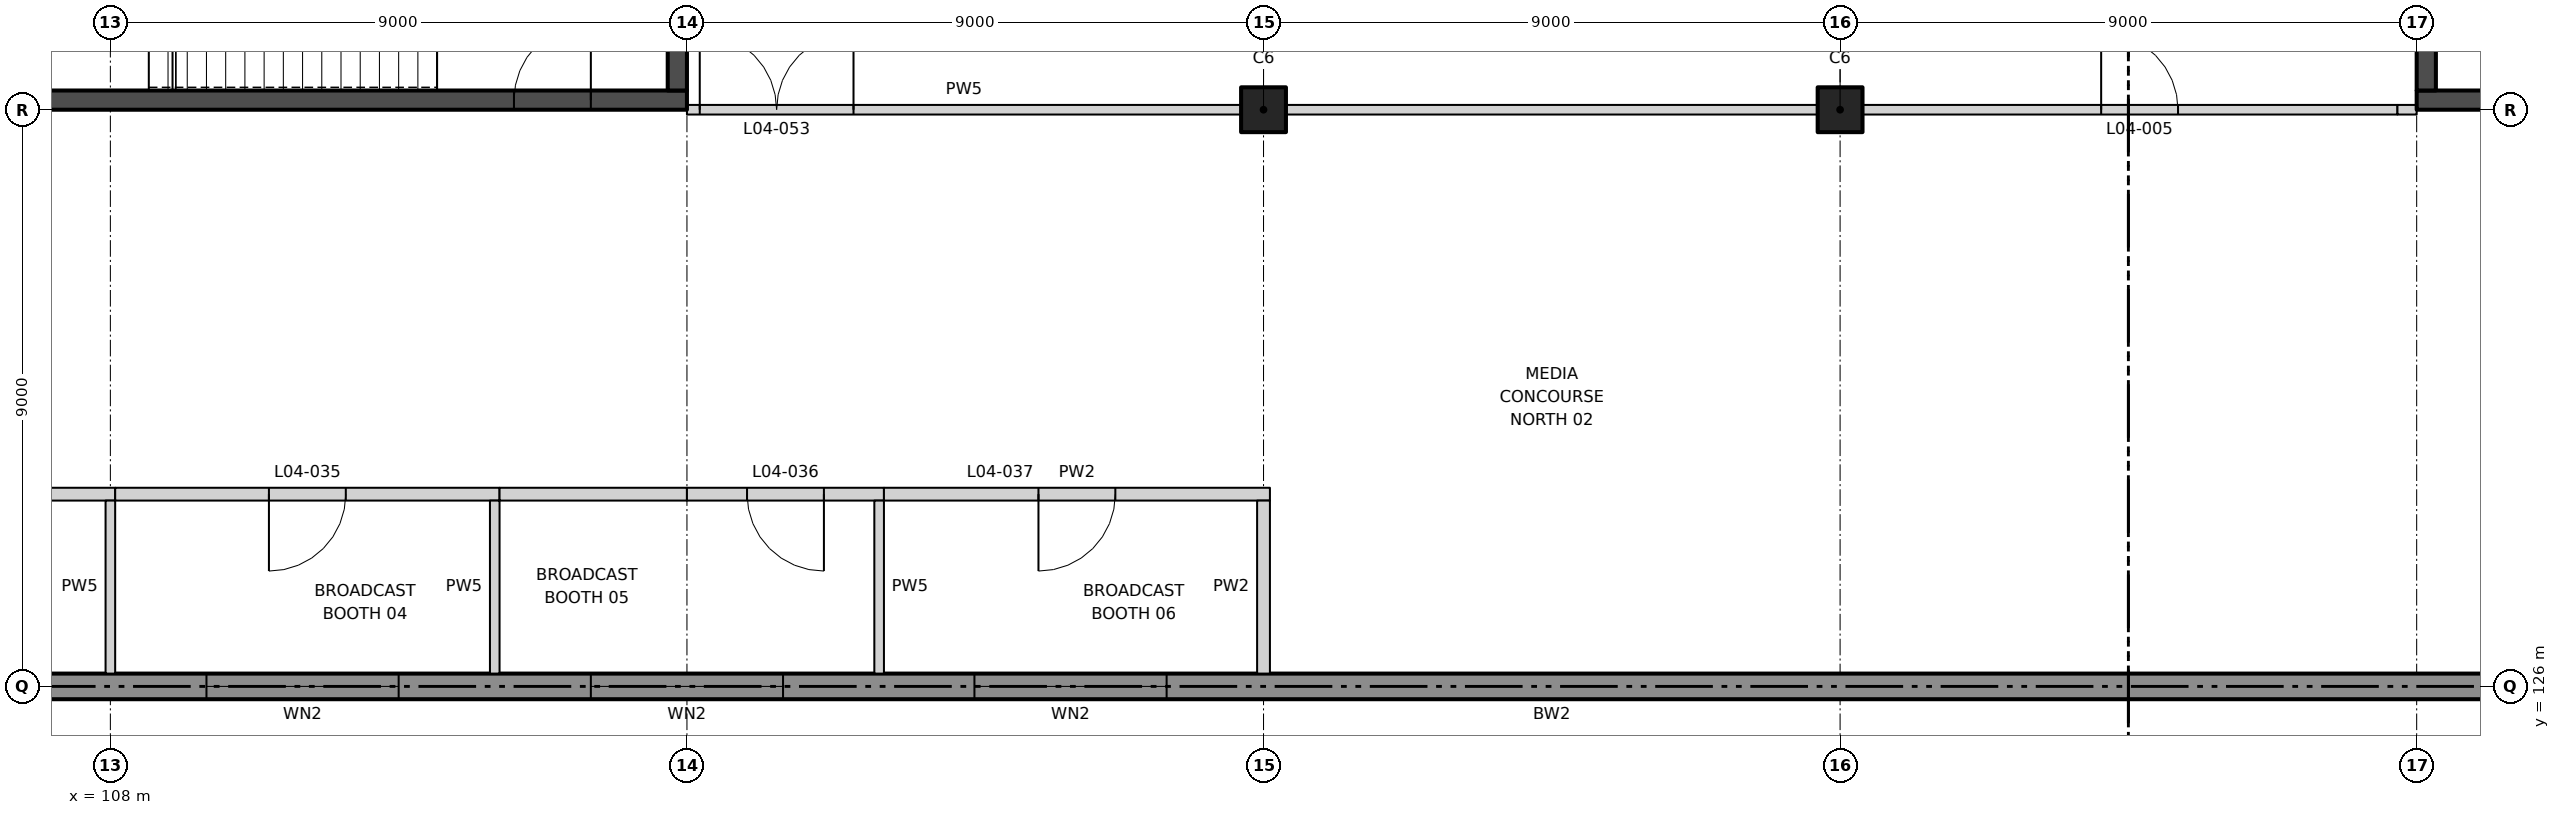
"""IFC4 building model, lengths in metres.
Left out: names, types, materials, properties, quantities, classifications, styles, units other than length and angle.
Written with IfcOpenShell. Run it as: python <this file> out.ifc"""

import sys

from ifc_helpers import new_model, si_unit, direction, frame, frame_2d, origin, origin_2d, place, context, subcontext, project, spatial, rectangle, extrude, element, fill, save


model = new_model("IFC4")
c1 = context("Model", 3, precision=1e-05, world=origin(), true_north=direction((0.0, 1.0)))
c2 = subcontext(c1, "Body", "Model", "MODEL_VIEW")
j1 = project(units=[si_unit("LENGTHUNIT", "METRE"), si_unit("PLANEANGLEUNIT", "RADIAN")], contexts=[c1])
p1 = place(None, origin())
s1 = spatial("IfcSite", under=j1, at=p1, CompositionType="ELEMENT")
p2 = place(p1, origin())
s2 = spatial("IfcBuilding", under=s1, at=p2, CompositionType="ELEMENT")
p3 = place(p2, frame((0.0, 0.0, 28.0)))
s3 = spatial("IfcBuildingStorey", under=s2, at=p3, CompositionType="ELEMENT", Elevation=28.0)
for number, where, z_axis, x_axis in (
    (1, (126.0, 135.0, 0.0), (0.0, 0.0, 1.0), (1.0, 0.0, 0.0)),
    (2, (135.0, 135.0, 0.0), (0.0, 0.0, 1.0), (1.0, 0.0, 0.0)),
):
    element("IfcColumn", number, at=place(p3, frame(where, z_axis=z_axis, x_axis=x_axis)), inside=s3, PredefinedType="COLUMN", context=c2, shape_type="SweptSolid", body=[
        extrude(rectangle(XDim=0.7, YDim=0.7, at=origin_2d()), origin(), (0.0, 0.0, 1.0), 5.5),
    ])
p4 = place(p3, frame((171.0, 126.0, 0.0), z_axis=(0.0, 0.0, 1.0), x_axis=(-1.0, 0.0, 0.0)))
e3 = element("IfcWall", 3, at=p4, inside=s3, PredefinedType="SOLIDWALL", context=c2, shape_type="SweptSolid", body=[
    extrude(rectangle(XDim=81.0, YDim=0.4, at=frame_2d((40.5, 0.0))), origin(), (0.0, 0.0, 1.0), 5.5),
])
p5 = place(p4, frame((75.288, 0.0, 0.9)))
e4 = element("IfcOpeningElement", 4, at=p5, cuts=e3, PredefinedType="OPENING", context=c2, shape_type="SweptSolid", body=[
    extrude(rectangle(XDim=3.0, YDim=1.8, at=frame_2d((1.5, 0.9))), frame((0.0, 0.21, 0.0), z_axis=(0.0, -1.0, 0.0), x_axis=(1.0, 0.0, 0.0)), (0.0, 0.0, 1.0), 0.42),
])
p6 = place(p4, frame((70.5, 0.0, 0.9)))
e5 = element("IfcOpeningElement", 5, at=p6, cuts=e3, PredefinedType="OPENING", context=c2, shape_type="SweptSolid", body=[
    extrude(rectangle(XDim=3.0, YDim=1.8, at=frame_2d((1.5, 0.9))), frame((0.0, 0.21, 0.0), z_axis=(0.0, -1.0, 0.0), x_axis=(1.0, 0.0, 0.0)), (0.0, 0.0, 1.0), 0.42),
])
p7 = place(p4, frame((64.5, 0.0, 0.9)))
e6 = element("IfcOpeningElement", 6, at=p7, cuts=e3, PredefinedType="OPENING", context=c2, shape_type="SweptSolid", body=[
    extrude(rectangle(XDim=3.0, YDim=1.8, at=frame_2d((1.5, 0.9))), frame((0.0, 0.21, 0.0), z_axis=(0.0, -1.0, 0.0), x_axis=(1.0, 0.0, 0.0)), (0.0, 0.0, 1.0), 0.42),
])
p8 = place(p4, frame((58.5, 0.0, 0.9)))
e7 = element("IfcOpeningElement", 7, at=p8, cuts=e3, PredefinedType="OPENING", context=c2, shape_type="SweptSolid", body=[
    extrude(rectangle(XDim=3.0, YDim=1.8, at=frame_2d((1.5, 0.9))), frame((0.0, 0.21, 0.0), z_axis=(0.0, -1.0, 0.0), x_axis=(1.0, 0.0, 0.0)), (0.0, 0.0, 1.0), 0.42),
])
p9 = place(p4, frame((52.5, 0.0, 0.9)))
e8 = element("IfcOpeningElement", 8, at=p9, cuts=e3, PredefinedType="OPENING", context=c2, shape_type="SweptSolid", body=[
    extrude(rectangle(XDim=3.0, YDim=1.8, at=frame_2d((1.5, 0.9))), frame((0.0, 0.21, 0.0), z_axis=(0.0, -1.0, 0.0), x_axis=(1.0, 0.0, 0.0)), (0.0, 0.0, 1.0), 0.42),
])
p10 = place(p4, frame((46.512, 0.0, 0.9)))
e9 = element("IfcOpeningElement", 9, at=p10, cuts=e3, PredefinedType="OPENING", context=c2, shape_type="SweptSolid", body=[
    extrude(rectangle(XDim=3.0, YDim=1.8, at=frame_2d((1.5, 0.9))), frame((0.0, 0.21, 0.0), z_axis=(0.0, -1.0, 0.0), x_axis=(1.0, 0.0, 0.0)), (0.0, 0.0, 1.0), 0.42),
])
p11 = place(p4, frame((3.9, 0.0, 0.0)))
e10 = element("IfcOpeningElement", 10, at=p11, cuts=e3, PredefinedType="OPENING", context=c2, shape_type="SweptSolid", body=[
    extrude(rectangle(XDim=1.2, YDim=2.1, at=frame_2d((0.6, 1.05))), frame((0.0, 0.21, 0.0), z_axis=(0.0, -1.0, 0.0), x_axis=(1.0, 0.0, 0.0)), (0.0, 0.0, 1.0), 0.42),
])
p12 = place(p4, frame((79.2, 0.0, 0.0)))
e11 = element("IfcOpeningElement", 11, at=p12, cuts=e3, PredefinedType="OPENING", context=c2, shape_type="SweptSolid", body=[
    extrude(rectangle(XDim=1.2, YDim=2.1, at=frame_2d((0.6, 1.05))), frame((0.0, 0.21, 0.0), z_axis=(0.0, -1.0, 0.0), x_axis=(1.0, 0.0, 0.0)), (0.0, 0.0, 1.0), 0.42),
])
p13 = place(p3, frame((102.075, 129.0, 0.0), z_axis=(0.0, 0.0, 1.0), x_axis=(1.0, 0.0, 0.0)))
e12 = element("IfcWall", 12, at=p13, inside=s3, PredefinedType="PARTITIONING", context=c2, shape_type="SweptSolid", body=[
    extrude(rectangle(XDim=6.0, YDim=0.2, at=frame_2d((3.0, 0.0))), origin(), (0.0, 0.0, 1.0), 5.5),
])
p14 = place(p13, frame((2.4, 0.0, 0.0)))
e13 = element("IfcOpeningElement", 13, at=p14, cuts=e12, PredefinedType="OPENING", context=c2, shape_type="SweptSolid", body=[
    extrude(rectangle(XDim=1.2, YDim=2.1, at=frame_2d((0.6, 1.05))), frame((0.0, 0.11, 0.0), z_axis=(0.0, -1.0, 0.0), x_axis=(1.0, 0.0, 0.0)), (0.0, 0.0, 1.0), 0.22),
])
p15 = place(p3, frame((108.075, 129.0, 0.0), z_axis=(0.0, 0.0, 1.0), x_axis=(1.0, 0.0, 0.0)))
e14 = element("IfcWall", 14, at=p15, inside=s3, PredefinedType="PARTITIONING", context=c2, shape_type="SweptSolid", body=[
    extrude(rectangle(XDim=6.0, YDim=0.2, at=frame_2d((3.0, 0.0))), origin(), (0.0, 0.0, 1.0), 5.5),
])
p16 = place(p15, frame((2.4, 0.0, 0.0)))
e15 = element("IfcOpeningElement", 15, at=p16, cuts=e14, PredefinedType="OPENING", context=c2, shape_type="SweptSolid", body=[
    extrude(rectangle(XDim=1.2, YDim=2.1, at=frame_2d((0.6, 1.05))), frame((0.0, 0.11, 0.0), z_axis=(0.0, -1.0, 0.0), x_axis=(1.0, 0.0, 0.0)), (0.0, 0.0, 1.0), 0.22),
])
p17 = place(p3, frame((114.075, 129.0, 0.0), z_axis=(0.0, 0.0, 1.0), x_axis=(1.0, 0.0, 0.0)))
e16 = element("IfcWall", 16, at=p17, inside=s3, PredefinedType="PARTITIONING", context=c2, shape_type="SweptSolid", body=[
    extrude(rectangle(XDim=2.925, YDim=0.2, at=frame_2d((1.462, 0.0))), origin(), (0.0, 0.0, 1.0), 5.5),
])
p18 = place(p3, frame((117.0, 129.0, 0.0), z_axis=(0.0, 0.0, 1.0), x_axis=(1.0, 0.0, 0.0)))
e17 = element("IfcWall", 17, at=p18, inside=s3, PredefinedType="PARTITIONING", context=c2, shape_type="SweptSolid", body=[
    extrude(rectangle(XDim=3.075, YDim=0.2, at=frame_2d((1.538, 0.0))), origin(), (0.0, 0.0, 1.0), 5.5),
])
p19 = place(p18, frame((0.938, 0.0, 0.0)))
e18 = element("IfcOpeningElement", 18, at=p19, cuts=e17, PredefinedType="OPENING", context=c2, shape_type="SweptSolid", body=[
    extrude(rectangle(XDim=1.2, YDim=2.1, at=frame_2d((0.6, 1.05))), frame((0.0, 0.11, 0.0), z_axis=(0.0, -1.0, 0.0), x_axis=(1.0, 0.0, 0.0)), (0.0, 0.0, 1.0), 0.22),
])
p20 = place(p3, frame((120.075, 129.0, 0.0), z_axis=(0.0, 0.0, 1.0), x_axis=(1.0, 0.0, 0.0)))
e19 = element("IfcWall", 19, at=p20, inside=s3, PredefinedType="PARTITIONING", context=c2, shape_type="SweptSolid", body=[
    extrude(rectangle(XDim=6.025, YDim=0.2, at=frame_2d((3.013, 0.0))), origin(), (0.0, 0.0, 1.0), 5.5),
])
p21 = place(p20, frame((2.412, 0.0, 0.0)))
e20 = element("IfcOpeningElement", 20, at=p21, cuts=e19, PredefinedType="OPENING", context=c2, shape_type="SweptSolid", body=[
    extrude(rectangle(XDim=1.2, YDim=2.1, at=frame_2d((0.6, 1.05))), frame((0.0, 0.11, 0.0), z_axis=(0.0, -1.0, 0.0), x_axis=(1.0, 0.0, 0.0)), (0.0, 0.0, 1.0), 0.22),
])
p22 = place(p3, frame((135.35, 135.0, 0.0), z_axis=(0.0, 0.0, 1.0), x_axis=(1.0, 0.0, 0.0)))
e21 = element("IfcWall", 21, at=p22, inside=s3, PredefinedType="PARTITIONING", context=c2, shape_type="SweptSolid", body=[
    extrude(rectangle(XDim=8.35, YDim=0.15, at=frame_2d((4.175, 0.0))), origin(), (0.0, 0.0, 1.0), 4.2),
])
p23 = place(p22, frame((3.725, 0.0, 0.0)))
e22 = element("IfcOpeningElement", 22, at=p23, cuts=e21, PredefinedType="OPENING", context=c2, shape_type="SweptSolid", body=[
    extrude(rectangle(XDim=1.2, YDim=2.1, at=frame_2d((0.6, 1.05))), frame((0.0, 0.085, 0.0), z_axis=(0.0, -1.0, 0.0), x_axis=(1.0, 0.0, 0.0)), (0.0, 0.0, 1.0), 0.17),
])
p24 = place(p3, frame((126.35, 135.0, 0.0), z_axis=(0.0, 0.0, 1.0), x_axis=(1.0, 0.0, 0.0)))
e23 = element("IfcWall", 23, at=p24, inside=s3, PredefinedType="PARTITIONING", context=c2, shape_type="SweptSolid", body=[
    extrude(rectangle(XDim=8.3, YDim=0.15, at=frame_2d((4.15, 0.0))), origin(), (0.0, 0.0, 1.0), 4.2),
])
p25 = place(p3, frame((117.0, 135.0, 0.0), z_axis=(0.0, 0.0, 1.0), x_axis=(1.0, 0.0, 0.0)))
e24 = element("IfcWall", 24, at=p25, inside=s3, PredefinedType="PARTITIONING", context=c2, shape_type="SweptSolid", body=[
    extrude(rectangle(XDim=8.65, YDim=0.15, at=frame_2d((4.325, 0.0))), origin(), (0.0, 0.0, 1.0), 4.2),
])
p26 = place(p25, frame((0.2, 0.0, 0.0)))
e25 = element("IfcOpeningElement", 25, at=p26, cuts=e24, PredefinedType="OPENING", context=c2, shape_type="SweptSolid", body=[
    extrude(rectangle(XDim=2.4, YDim=2.4, at=frame_2d((1.2, 1.2))), frame((0.0, 0.085, 0.0), z_axis=(0.0, -1.0, 0.0), x_axis=(1.0, 0.0, 0.0)), (0.0, 0.0, 1.0), 0.17),
])
p27 = place(p3, frame((108.0, 126.2, 0.0), z_axis=(0.0, 0.0, 1.0), x_axis=(0.0, 1.0, 0.0)))
e26 = element("IfcWall", 26, at=p27, inside=s3, PredefinedType="PARTITIONING", context=c2, shape_type="SweptSolid", body=[
    extrude(rectangle(XDim=2.7, YDim=0.15, at=frame_2d((1.35, 0.0))), origin(), (0.0, 0.0, 1.0), 4.2),
])
for number, where, z_axis, x_axis in (
    (27, (114.0, 126.2, 0.0), (0.0, 0.0, 1.0), (0.0, 1.0, 0.0)),
    (28, (120.0, 126.2, 0.0), (0.0, 0.0, 1.0), (0.0, 1.0, 0.0)),
):
    element("IfcWall", number, at=place(p3, frame(where, z_axis=z_axis, x_axis=x_axis)), inside=s3, PredefinedType="PARTITIONING", context=c2, shape_type="SweptSolid", body=[
        extrude(rectangle(XDim=2.7, YDim=0.15, at=frame_2d((1.35, 0.0))), origin(), (0.0, 0.0, 1.0), 5.5),
    ])
p28 = place(p3, frame((126.0, 126.2, 0.0), z_axis=(0.0, 0.0, 1.0), x_axis=(0.0, 1.0, 0.0)))
e29 = element("IfcWall", 29, at=p28, inside=s3, PredefinedType="PARTITIONING", context=c2, shape_type="SweptSolid", body=[
    extrude(rectangle(XDim=2.7, YDim=0.2, at=frame_2d((1.35, 0.0))), origin(), (0.0, 0.0, 1.0), 4.2),
])
p29 = place(p3, frame((117.0, 135.15, 0.0), z_axis=(0.0, 0.0, 1.0), x_axis=(-1.0, 0.0, 0.0)))
e30 = element("IfcWall", 30, at=p29, inside=s3, PredefinedType="SHEAR", context=c2, shape_type="SweptSolid", body=[
    extrude(rectangle(XDim=18.0, YDim=0.3, at=frame_2d((9.0, 0.0))), origin(), (0.0, 0.0, 1.0), 5.5),
])
p30 = place(p29, frame((1.5, 0.0, 0.0)))
e31 = element("IfcOpeningElement", 31, at=p30, cuts=e30, PredefinedType="OPENING", context=c2, shape_type="SweptSolid", body=[
    extrude(rectangle(XDim=1.2, YDim=2.1, at=frame_2d((0.6, 1.05))), frame((0.0, 0.16, 0.0), z_axis=(0.0, -1.0, 0.0), x_axis=(1.0, 0.0, 0.0)), (0.0, 0.0, 1.0), 0.32),
])
p31 = place(p3, frame((116.85, 135.3, 0.0), z_axis=(0.0, 0.0, 1.0), x_axis=(0.0, 1.0, 0.0)))
e32 = element("IfcWall", 32, at=p31, inside=s3, PredefinedType="SHEAR", context=c2, shape_type="SweptSolid", body=[
    extrude(rectangle(XDim=8.7, YDim=0.3, at=frame_2d((4.35, 0.0))), origin(), (0.0, 0.0, 1.0), 5.5),
])
p32 = place(p3, frame((144.0, 135.15, 0.0), z_axis=(0.0, 0.0, 1.0), x_axis=(1.0, 0.0, 0.0)))
e33 = element("IfcWall", 33, at=p32, inside=s3, PredefinedType="SHEAR", context=c2, shape_type="SweptSolid", body=[
    extrude(rectangle(XDim=18.0, YDim=0.3, at=frame_2d((9.0, 0.0))), origin(), (0.0, 0.0, 1.0), 5.5),
])
p33 = place(p32, frame((1.5, 0.0, 0.0)))
e34 = element("IfcOpeningElement", 34, at=p33, cuts=e33, PredefinedType="OPENING", context=c2, shape_type="SweptSolid", body=[
    extrude(rectangle(XDim=1.2, YDim=2.1, at=frame_2d((0.6, 1.05))), frame((0.0, 0.16, 0.0), z_axis=(0.0, -1.0, 0.0), x_axis=(1.0, 0.0, 0.0)), (0.0, 0.0, 1.0), 0.32),
])
p34 = place(p3, frame((144.15, 135.3, 0.0), z_axis=(0.0, 0.0, 1.0), x_axis=(0.0, 1.0, 0.0)))
e35 = element("IfcWall", 35, at=p34, inside=s3, PredefinedType="SHEAR", context=c2, shape_type="SweptSolid", body=[
    extrude(rectangle(XDim=8.7, YDim=0.3, at=frame_2d((4.35, 0.0))), origin(), (0.0, 0.0, 1.0), 5.5),
])
p35 = place(p3, frame((143.7, 135.0, 0.0), z_axis=(0.0, 0.0, 1.0), x_axis=(1.0, 0.0, 0.0)))
e36 = element("IfcWall", 36, at=p35, inside=s3, PredefinedType="PARTITIONING", context=c2, shape_type="SweptSolid", body=[
    extrude(rectangle(XDim=0.3, YDim=0.15, at=frame_2d((0.15, 0.0))), origin(), (0.0, 0.0, 1.0), 5.5),
])
p36 = place(p23, origin())
e37 = element("IfcDoor", 37, at=p36, inside=s3, OperationType="SINGLE_SWING_LEFT", PredefinedType="DOOR", context=c2, shape_type="SweptSolid", body=[
    extrude(rectangle(XDim=1.2, YDim=2.1, at=frame_2d((0.6, 1.05))), frame((0.0, 0.025, 0.0), z_axis=(0.0, -1.0, 0.0), x_axis=(1.0, 0.0, 0.0)), (0.0, 0.0, 1.0), 0.05),
])
fill(e22, e37)
p37 = place(p16, frame((1.2, 0.0, 0.0), z_axis=(0.0, 0.0, 1.0), x_axis=(-1.0, 0.0, 0.0)))
e38 = element("IfcDoor", 38, at=p37, inside=s3, OperationType="SINGLE_SWING_RIGHT", PredefinedType="DOOR", context=c2, shape_type="SweptSolid", body=[
    extrude(rectangle(XDim=1.2, YDim=2.1, at=frame_2d((0.6, 1.05))), frame((0.0, 0.025, 0.0), z_axis=(0.0, -1.0, 0.0), x_axis=(1.0, 0.0, 0.0)), (0.0, 0.0, 1.0), 0.05),
])
fill(e15, e38)
p38 = place(p19, frame((1.2, 0.0, 0.0), z_axis=(0.0, 0.0, 1.0), x_axis=(-1.0, 0.0, 0.0)))
e39 = element("IfcDoor", 39, at=p38, inside=s3, OperationType="SINGLE_SWING_LEFT", PredefinedType="DOOR", context=c2, shape_type="SweptSolid", body=[
    extrude(rectangle(XDim=1.2, YDim=2.1, at=frame_2d((0.6, 1.05))), frame((0.0, 0.025, 0.0), z_axis=(0.0, -1.0, 0.0), x_axis=(1.0, 0.0, 0.0)), (0.0, 0.0, 1.0), 0.05),
])
fill(e18, e39)
p39 = place(p21, frame((1.2, 0.0, 0.0), z_axis=(0.0, 0.0, 1.0), x_axis=(-1.0, 0.0, 0.0)))
e40 = element("IfcDoor", 40, at=p39, inside=s3, OperationType="SINGLE_SWING_RIGHT", PredefinedType="DOOR", context=c2, shape_type="SweptSolid", body=[
    extrude(rectangle(XDim=1.2, YDim=2.1, at=frame_2d((0.6, 1.05))), frame((0.0, 0.025, 0.0), z_axis=(0.0, -1.0, 0.0), x_axis=(1.0, 0.0, 0.0)), (0.0, 0.0, 1.0), 0.05),
])
fill(e20, e40)
p40 = place(p26, origin())
e41 = element("IfcDoor", 41, at=p40, inside=s3, OperationType="DOUBLE_DOOR_DOUBLE_SWING", PredefinedType="DOOR", context=c2, shape_type="SweptSolid", body=[
    extrude(rectangle(XDim=2.4, YDim=2.4, at=frame_2d((1.2, 1.2))), frame((0.0, 0.025, 0.0), z_axis=(0.0, -1.0, 0.0), x_axis=(1.0, 0.0, 0.0)), (0.0, 0.0, 1.0), 0.05),
])
fill(e25, e41)
p41 = place(p8, origin())
e42 = element("IfcWindow", 42, at=p41, inside=s3, PartitioningType="SINGLE_PANEL", PredefinedType="WINDOW", context=c2, shape_type="SweptSolid", body=[
    extrude(rectangle(XDim=3.0, YDim=1.8, at=frame_2d((1.5, 0.9))), frame((0.0, 0.03, 0.0), z_axis=(0.0, -1.0, 0.0), x_axis=(1.0, 0.0, 0.0)), (0.0, 0.0, 1.0), 0.06),
])
fill(e7, e42)
p42 = place(p9, origin())
e43 = element("IfcWindow", 43, at=p42, inside=s3, PartitioningType="SINGLE_PANEL", PredefinedType="WINDOW", context=c2, shape_type="SweptSolid", body=[
    extrude(rectangle(XDim=3.0, YDim=1.8, at=frame_2d((1.5, 0.9))), frame((0.0, 0.03, 0.0), z_axis=(0.0, -1.0, 0.0), x_axis=(1.0, 0.0, 0.0)), (0.0, 0.0, 1.0), 0.06),
])
fill(e8, e43)
p43 = place(p10, origin())
e44 = element("IfcWindow", 44, at=p43, inside=s3, PartitioningType="SINGLE_PANEL", PredefinedType="WINDOW", context=c2, shape_type="SweptSolid", body=[
    extrude(rectangle(XDim=3.0, YDim=1.8, at=frame_2d((1.5, 0.9))), frame((0.0, 0.03, 0.0), z_axis=(0.0, -1.0, 0.0), x_axis=(1.0, 0.0, 0.0)), (0.0, 0.0, 1.0), 0.06),
])
fill(e9, e44)
p44 = place(p30, frame((1.2, 0.0, 0.0), z_axis=(0.0, 0.0, 1.0), x_axis=(-1.0, 0.0, 0.0)))
e45 = element("IfcDoor", 45, at=p44, inside=s3, OperationType="SINGLE_SWING_RIGHT", PredefinedType="DOOR", context=c2, shape_type="SweptSolid", body=[
    extrude(rectangle(XDim=1.2, YDim=2.1, at=frame_2d((0.6, 1.05))), frame((0.0, 0.025, 0.0), z_axis=(0.0, -1.0, 0.0), x_axis=(1.0, 0.0, 0.0)), (0.0, 0.0, 1.0), 0.05),
])
fill(e31, e45)
save(model, sys.argv[1])
